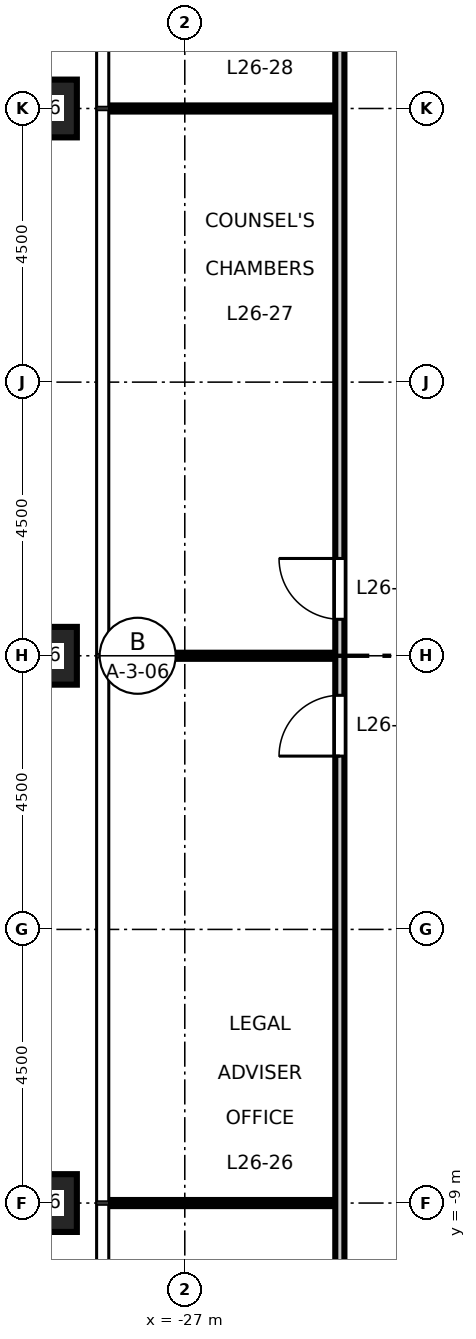
"""IFC4 building model, lengths in metres.
Left out: names, types, materials, properties, quantities, classifications, styles, units other than length and angle.
Written with IfcOpenShell. Run it as: python <this file> out.ifc"""

import sys

from ifc_helpers import new_model, si_unit, direction, frame, frame_2d, origin, origin_2d, place, context, subcontext, project, spatial, rectangle, hollow_rectangle, extrude, element, fill, save


model = new_model("IFC4")
c1 = context("Model", 3, precision=1e-05, world=origin(), true_north=direction((0.0, 1.0)))
c2 = subcontext(c1, "Body", "Model", "MODEL_VIEW")
j1 = project(units=[si_unit("LENGTHUNIT", "METRE"), si_unit("PLANEANGLEUNIT", "RADIAN")], contexts=[c1])
p1 = place(None, origin())
s1 = spatial("IfcSite", under=j1, at=p1, CompositionType="ELEMENT")
p2 = place(p1, origin())
s2 = spatial("IfcBuilding", under=s1, at=p2, CompositionType="ELEMENT")
p3 = place(p2, frame((0.0, 0.0, 122.7)))
s3 = spatial("IfcBuildingStorey", under=s2, at=p3, CompositionType="ELEMENT", Elevation=122.7)
for number, where, z_axis, x_axis in (
    (1, (-29.25, 9.0, 0.0), (0.0, 0.0, 1.0), (1.0, 0.0, 0.0)),
    (2, (-29.25, 0.0, 0.0), (0.0, 0.0, 1.0), (1.0, 0.0, 0.0)),
    (3, (-29.25, -9.0, 0.0), (0.0, 0.0, 1.0), (1.0, 0.0, 0.0)),
):
    element("IfcColumn", number, at=place(p3, frame(where, z_axis=z_axis, x_axis=x_axis)), inside=s3, PredefinedType="COLUMN", context=c2, shape_type="SweptSolid", body=[
        extrude(hollow_rectangle(XDim=0.95, YDim=0.95, WallThickness=0.055, at=origin_2d()), origin(), (0.0, 0.0, 1.0), 4.5),
    ])
for number, where, z_axis, x_axis in (
    (4, (-28.26, -9.0, 0.0), (0.0, 0.0, 1.0), (1.0, 0.0, 0.0)),
    (5, (-28.26, 0.0, 0.0), (0.0, 0.0, 1.0), (1.0, 0.0, 0.0)),
    (6, (-28.26, 9.0, 0.0), (0.0, 0.0, 1.0), (1.0, 0.0, 0.0)),
):
    element("IfcWall", number, at=place(p3, frame(where, z_axis=z_axis, x_axis=x_axis)), inside=s3, PredefinedType="PARTITIONING", context=c2, shape_type="SweptSolid", body=[
        extrude(rectangle(XDim=3.735, YDim=0.1, at=frame_2d((1.868, 0.0))), origin(), (0.0, 0.0, 1.0), 4.35),
    ])
p4 = place(p3, frame((-24.45, -17.925, 0.0), z_axis=(0.0, 0.0, 1.0), x_axis=(0.0, 1.0, 0.0)))
e7 = element("IfcWall", 7, at=p4, inside=s3, PredefinedType="PARTITIONING", context=c2, shape_type="SweptSolid", body=[
    extrude(rectangle(XDim=35.85, YDim=0.15, at=frame_2d((17.925, 0.0))), origin(), (0.0, 0.0, 1.0), 4.35),
])
p5 = place(p4, frame((0.525, 0.0, 0.0)))
e8 = element("IfcOpeningElement", 8, at=p5, cuts=e7, PredefinedType="OPENING", context=c2, shape_type="SweptSolid", body=[
    extrude(rectangle(XDim=1.0, YDim=2.1, at=frame_2d((0.5, 1.05))), frame((0.0, 0.085, 0.0), z_axis=(0.0, -1.0, 0.0), x_axis=(1.0, 0.0, 0.0)), (0.0, 0.0, 1.0), 0.17),
])
p6 = place(p4, frame((16.275, 0.0, 0.0)))
e9 = element("IfcOpeningElement", 9, at=p6, cuts=e7, PredefinedType="OPENING", context=c2, shape_type="SweptSolid", body=[
    extrude(rectangle(XDim=1.0, YDim=2.1, at=frame_2d((0.5, 1.05))), frame((0.0, 0.085, 0.0), z_axis=(0.0, -1.0, 0.0), x_axis=(1.0, 0.0, 0.0)), (0.0, 0.0, 1.0), 0.17),
])
p7 = place(p4, frame((18.525, 0.0, 0.0)))
e10 = element("IfcOpeningElement", 10, at=p7, cuts=e7, PredefinedType="OPENING", context=c2, shape_type="SweptSolid", body=[
    extrude(rectangle(XDim=1.0, YDim=2.1, at=frame_2d((0.5, 1.05))), frame((0.0, 0.085, 0.0), z_axis=(0.0, -1.0, 0.0), x_axis=(1.0, 0.0, 0.0)), (0.0, 0.0, 1.0), 0.17),
])
p8 = place(p4, frame((34.275, 0.0, 0.0)))
e11 = element("IfcOpeningElement", 11, at=p8, cuts=e7, PredefinedType="OPENING", context=c2, shape_type="SweptSolid", body=[
    extrude(rectangle(XDim=1.0, YDim=2.1, at=frame_2d((0.5, 1.05))), frame((0.0, 0.085, 0.0), z_axis=(0.0, -1.0, 0.0), x_axis=(1.0, 0.0, 0.0)), (0.0, 0.0, 1.0), 0.17),
])
p9 = place(p6, origin())
e12 = element("IfcDoor", 12, at=p9, inside=s3, OperationType="SINGLE_SWING_LEFT", PredefinedType="DOOR", context=c2, shape_type="SweptSolid", body=[
    extrude(rectangle(XDim=1.0, YDim=2.1, at=frame_2d((0.5, 1.05))), frame((0.0, 0.025, 0.0), z_axis=(0.0, -1.0, 0.0), x_axis=(1.0, 0.0, 0.0)), (0.0, 0.0, 1.0), 0.05),
])
fill(e9, e12)
p10 = place(p7, origin())
e13 = element("IfcDoor", 13, at=p10, inside=s3, OperationType="SINGLE_SWING_RIGHT", PredefinedType="DOOR", context=c2, shape_type="SweptSolid", body=[
    extrude(rectangle(XDim=1.0, YDim=2.1, at=frame_2d((0.5, 1.05))), frame((0.0, 0.025, 0.0), z_axis=(0.0, -1.0, 0.0), x_axis=(1.0, 0.0, 0.0)), (0.0, 0.0, 1.0), 0.05),
])
fill(e10, e13)
save(model, sys.argv[1])
